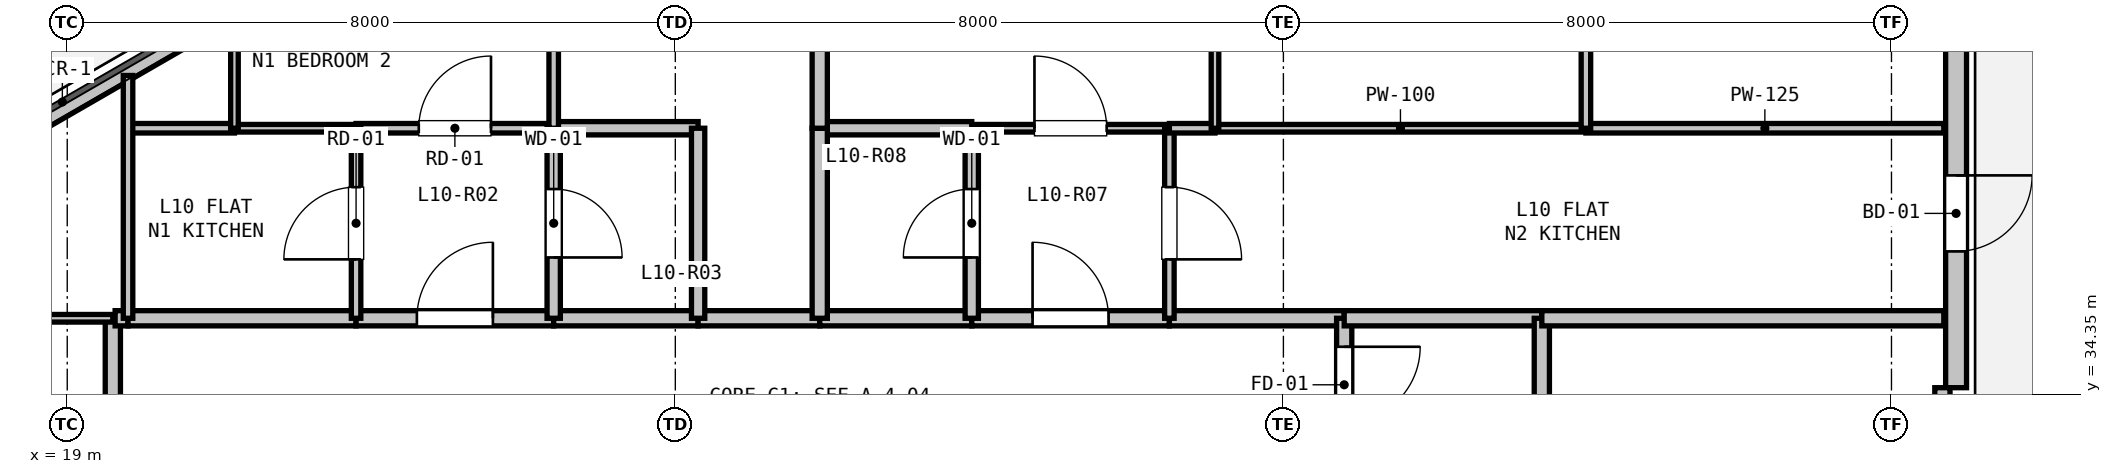
"""IFC4 building model, lengths in metres.
Left out: names, types, materials, properties, quantities, classifications, styles, units other than length and angle.
Written with IfcOpenShell. Run it as: python <this file> out.ifc"""

import sys

from ifc_helpers import new_model, si_unit, direction, frame, frame_2d, origin, place, context, subcontext, project, spatial, rectangle, extrude, element, fill, save


model = new_model("IFC4")
c1 = context("Model", 3, precision=1e-05, world=origin(), true_north=direction((0.0, 1.0)))
c2 = subcontext(c1, "Body", "Model", "MODEL_VIEW")
j1 = project(units=[si_unit("LENGTHUNIT", "METRE"), si_unit("PLANEANGLEUNIT", "RADIAN")], contexts=[c1])
p1 = place(None, origin())
s1 = spatial("IfcSite", under=j1, at=p1, CompositionType="ELEMENT")
p2 = place(p1, origin())
s2 = spatial("IfcBuilding", under=s1, at=p2, CompositionType="ELEMENT")
p3 = place(p2, frame((0.0, 0.0, 39.0)))
s3 = spatial("IfcBuildingStorey", under=s2, at=p3, CompositionType="ELEMENT", Elevation=39.0)
p4 = place(p3, frame((16.39, 36.617, 0.0), z_axis=(0.0, 0.0, 1.0), x_axis=(0.866027351828, 0.499996625875, 0.0)))
e1 = element("IfcWall", 1, at=p4, inside=s3, PredefinedType="PARAPET", context=c2, shape_type="SweptSolid", body=[
    extrude(rectangle(XDim=11.973, YDim=0.2, at=frame_2d((5.987, 0.0))), origin(), (0.0, 0.0, 1.0), 0.2),
])
p5 = place(p3, frame((43.85, 47.11, 0.0), z_axis=(0.0, 0.0, 1.0), x_axis=(0.0, -1.0, 0.0)))
e2 = element("IfcWall", 2, at=p5, inside=s3, PredefinedType="SOLIDWALL", context=c2, shape_type="SweptSolid", body=[
    extrude(rectangle(XDim=12.673, YDim=0.275, at=frame_2d((6.336, 0.0))), origin(), (0.0, 0.0, 1.0), 2.66),
])
p6 = place(p5, frame((9.88, 0.0, 0.0)))
e3 = element("IfcOpeningElement", 3, at=p6, cuts=e2, PredefinedType="OPENING", context=c2, shape_type="SweptSolid", body=[
    extrude(rectangle(XDim=1.0, YDim=2.1, at=frame_2d((0.5, 1.05))), frame((0.0, 0.147, 0.0), z_axis=(0.0, -1.0, 0.0), x_axis=(1.0, 0.0, 0.0)), (0.0, 0.0, 1.0), 0.295),
])
p7 = place(p3, frame((43.67, 34.437, 0.0), z_axis=(0.0, 0.0, 1.0), x_axis=(0.0, -1.0, 0.0)))
e4 = element("IfcWall", 4, at=p7, inside=s3, PredefinedType="PARAPET", context=c2, shape_type="SweptSolid", body=[
    extrude(rectangle(XDim=1.7, YDim=0.2, at=frame_2d((0.85, 0.0))), origin(), (0.0, 0.0, 1.0), 2.66),
])
p8 = place(p3, frame((19.6, 31.45, 0.0), z_axis=(0.0, 0.0, 1.0), x_axis=(0.0, 1.0, 0.0)))
e5 = element("IfcWall", 5, at=p8, inside=s3, PredefinedType="PARTITIONING", context=c2, shape_type="SweptSolid", body=[
    extrude(rectangle(XDim=3.9, YDim=0.2, at=frame_2d((1.95, 0.0))), origin(), (0.0, 0.0, 1.0), 2.337),
])
p9 = place(p3, frame((19.63, 35.35, 0.0), z_axis=(0.0, 0.0, 1.0), x_axis=(1.0, 0.0, 0.0)))
e6 = element("IfcWall", 6, at=p9, inside=s3, PredefinedType="PARTITIONING", context=c2, shape_type="SweptSolid", body=[
    extrude(rectangle(XDim=0.17, YDim=0.2, at=frame_2d((0.085, 0.0))), origin(), (0.0, 0.0, 1.0), 3.04),
])
p10 = place(p3, frame((19.8, 35.35, 0.0), z_axis=(0.0, 0.0, 1.0), x_axis=(1.0, 0.0, 0.0)))
e7 = element("IfcWall", 7, at=p10, inside=s3, PredefinedType="PARTITIONING", context=c2, shape_type="SweptSolid", body=[
    extrude(rectangle(XDim=3.0, YDim=0.2, at=frame_2d((1.5, 0.0))), origin(), (0.0, 0.0, 1.0), 3.04),
])
p11 = place(p3, frame((22.8, 35.35, 0.0), z_axis=(0.0, 0.0, 1.0), x_axis=(1.0, 0.0, 0.0)))
e8 = element("IfcWall", 8, at=p11, inside=s3, PredefinedType="PARTITIONING", context=c2, shape_type="SweptSolid", body=[
    extrude(rectangle(XDim=2.6, YDim=0.2, at=frame_2d((1.3, 0.0))), origin(), (0.0, 0.0, 1.0), 3.04),
])
p12 = place(p11, frame((0.8, 0.0, 0.0)))
e9 = element("IfcOpeningElement", 9, at=p12, cuts=e8, PredefinedType="OPENING", context=c2, shape_type="SweptSolid", body=[
    extrude(rectangle(XDim=1.0, YDim=2.15, at=frame_2d((0.5, 1.075))), frame((0.0, 0.11, 0.0), z_axis=(0.0, -1.0, 0.0), x_axis=(1.0, 0.0, 0.0)), (0.0, 0.0, 1.0), 0.22),
])
p13 = place(p3, frame((25.4, 35.35, 0.0), z_axis=(0.0, 0.0, 1.0), x_axis=(1.0, 0.0, 0.0)))
e10 = element("IfcWall", 10, at=p13, inside=s3, PredefinedType="PARTITIONING", context=c2, shape_type="SweptSolid", body=[
    extrude(rectangle(XDim=1.9, YDim=0.2, at=frame_2d((0.95, 0.0))), origin(), (0.0, 0.0, 1.0), 3.04),
])
p14 = place(p3, frame((27.3, 35.35, 0.0), z_axis=(0.0, 0.0, 1.0), x_axis=(1.0, 0.0, 0.0)))
e11 = element("IfcWall", 11, at=p14, inside=s3, PredefinedType="PARTITIONING", context=c2, shape_type="SweptSolid", body=[
    extrude(rectangle(XDim=1.6, YDim=0.2, at=frame_2d((0.8, 0.0))), origin(), (0.0, 0.0, 1.0), 3.04),
])
p15 = place(p3, frame((28.9, 35.35, 0.0), z_axis=(0.0, 0.0, 1.0), x_axis=(1.0, 0.0, 0.0)))
e12 = element("IfcWall", 12, at=p15, inside=s3, PredefinedType="PARTITIONING", context=c2, shape_type="SweptSolid", body=[
    extrude(rectangle(XDim=2.0, YDim=0.2, at=frame_2d((1.0, 0.0))), origin(), (0.0, 0.0, 1.0), 3.04),
])
p16 = place(p3, frame((30.9, 35.35, 0.0), z_axis=(0.0, 0.0, 1.0), x_axis=(1.0, 0.0, 0.0)))
e13 = element("IfcWall", 13, at=p16, inside=s3, PredefinedType="PARTITIONING", context=c2, shape_type="SweptSolid", body=[
    extrude(rectangle(XDim=2.6, YDim=0.2, at=frame_2d((1.3, 0.0))), origin(), (0.0, 0.0, 1.0), 3.04),
])
p17 = place(p16, frame((0.8, 0.0, 0.0)))
e14 = element("IfcOpeningElement", 14, at=p17, cuts=e13, PredefinedType="OPENING", context=c2, shape_type="SweptSolid", body=[
    extrude(rectangle(XDim=1.0, YDim=2.15, at=frame_2d((0.5, 1.075))), frame((0.0, 0.11, 0.0), z_axis=(0.0, -1.0, 0.0), x_axis=(1.0, 0.0, 0.0)), (0.0, 0.0, 1.0), 0.22),
])
p18 = place(p3, frame((33.5, 35.35, 0.0), z_axis=(0.0, 0.0, 1.0), x_axis=(1.0, 0.0, 0.0)))
e15 = element("IfcWall", 15, at=p18, inside=s3, PredefinedType="PARTITIONING", context=c2, shape_type="SweptSolid", body=[
    extrude(rectangle(XDim=2.3, YDim=0.2, at=frame_2d((1.15, 0.0))), origin(), (0.0, 0.0, 1.0), 3.04),
])
p19 = place(p3, frame((35.8, 35.35, 0.0), z_axis=(0.0, 0.0, 1.0), x_axis=(0.0, -1.0, 0.0)))
e16 = element("IfcWall", 16, at=p19, inside=s3, PredefinedType="PARTITIONING", context=c2, shape_type="SweptSolid", body=[
    extrude(rectangle(XDim=1.75, YDim=0.2, at=frame_2d((0.875, 0.0))), origin(), (0.0, 0.0, 1.0), 3.04),
])
p20 = place(p19, frame((0.375, 0.0, 0.0)))
e17 = element("IfcOpeningElement", 17, at=p20, cuts=e16, PredefinedType="OPENING", context=c2, shape_type="SweptSolid", body=[
    extrude(rectangle(XDim=1.0, YDim=2.15, at=frame_2d((0.5, 1.075))), frame((0.0, 0.11, 0.0), z_axis=(0.0, -1.0, 0.0), x_axis=(1.0, 0.0, 0.0)), (0.0, 0.0, 1.0), 0.22),
])
p21 = place(p3, frame((35.8, 35.35, 0.0), z_axis=(0.0, 0.0, 1.0), x_axis=(1.0, 0.0, 0.0)))
e18 = element("IfcWall", 18, at=p21, inside=s3, PredefinedType="PARTITIONING", context=c2, shape_type="SweptSolid", body=[
    extrude(rectangle(XDim=2.6, YDim=0.2, at=frame_2d((1.3, 0.0))), origin(), (0.0, 0.0, 1.0), 2.337),
])
p22 = place(p3, frame((38.4, 35.35, 0.0), z_axis=(0.0, 0.0, 1.0), x_axis=(0.0, -1.0, 0.0)))
e19 = element("IfcWall", 19, at=p22, inside=s3, PredefinedType="PARTITIONING", context=c2, shape_type="SweptSolid", body=[
    extrude(rectangle(XDim=5.35, YDim=0.2, at=frame_2d((2.675, 0.0))), origin(), (0.0, 0.0, 1.0), 2.337),
])
p23 = place(p3, frame((22.8, 37.85, 0.0), z_axis=(0.0, 0.0, 1.0), x_axis=(1.0, 0.0, 0.0)))
e20 = element("IfcWall", 20, at=p23, inside=s3, PredefinedType="PARTITIONING", context=c2, shape_type="SweptSolid", body=[
    extrude(rectangle(XDim=2.6, YDim=0.125, at=frame_2d((1.3, 0.0))), origin(), (0.0, 0.0, 1.0), 3.04),
])
p24 = place(p23, frame((0.825, 0.0, 0.0)))
e21 = element("IfcOpeningElement", 21, at=p24, cuts=e20, PredefinedType="OPENING", context=c2, shape_type="SweptSolid", body=[
    extrude(rectangle(XDim=0.95, YDim=2.1, at=frame_2d((0.475, 1.05))), frame((0.0, 0.073, 0.0), z_axis=(0.0, -1.0, 0.0), x_axis=(1.0, 0.0, 0.0)), (0.0, 0.0, 1.0), 0.145),
])
p25 = place(p3, frame((25.4, 37.85, 0.0), z_axis=(0.0, 0.0, 1.0), x_axis=(0.0, -1.0, 0.0)))
e22 = element("IfcWall", 22, at=p25, inside=s3, PredefinedType="PLUMBINGWALL", context=c2, shape_type="SweptSolid", body=[
    extrude(rectangle(XDim=2.5, YDim=0.175, at=frame_2d((1.25, 0.0))), origin(), (0.0, 0.0, 1.0), 3.04),
])
p26 = place(p25, frame((0.8, 0.0, 0.0)))
e23 = element("IfcOpeningElement", 23, at=p26, cuts=e22, PredefinedType="OPENING", context=c2, shape_type="SweptSolid", body=[
    extrude(rectangle(XDim=0.9, YDim=2.1, at=frame_2d((0.45, 1.05))), frame((0.0, 0.097, 0.0), z_axis=(0.0, -1.0, 0.0), x_axis=(1.0, 0.0, 0.0)), (0.0, 0.0, 1.0), 0.195),
])
p27 = place(p3, frame((22.8, 35.35, 0.0), z_axis=(0.0, 0.0, 1.0), x_axis=(0.0, 1.0, 0.0)))
e24 = element("IfcWall", 24, at=p27, inside=s3, PredefinedType="PARTITIONING", context=c2, shape_type="SweptSolid", body=[
    extrude(rectangle(XDim=2.5, YDim=0.125, at=frame_2d((1.25, 0.0))), origin(), (0.0, 0.0, 1.0), 3.04),
])
p28 = place(p27, frame((0.775, 0.0, 0.0)))
e25 = element("IfcOpeningElement", 25, at=p28, cuts=e24, PredefinedType="OPENING", context=c2, shape_type="SweptSolid", body=[
    extrude(rectangle(XDim=0.95, YDim=2.1, at=frame_2d((0.475, 1.05))), frame((0.0, 0.073, 0.0), z_axis=(0.0, -1.0, 0.0), x_axis=(1.0, 0.0, 0.0)), (0.0, 0.0, 1.0), 0.145),
])
p29 = place(p3, frame((30.9, 37.85, 0.0), z_axis=(0.0, 0.0, 1.0), x_axis=(1.0, 0.0, 0.0)))
e26 = element("IfcWall", 26, at=p29, inside=s3, PredefinedType="PARTITIONING", context=c2, shape_type="SweptSolid", body=[
    extrude(rectangle(XDim=2.6, YDim=0.1, at=frame_2d((1.3, 0.0))), origin(), (0.0, 0.0, 1.0), 3.04),
])
p30 = place(p29, frame((0.825, 0.0, 0.0)))
e27 = element("IfcOpeningElement", 27, at=p30, cuts=e26, PredefinedType="OPENING", context=c2, shape_type="SweptSolid", body=[
    extrude(rectangle(XDim=0.95, YDim=2.1, at=frame_2d((0.475, 1.05))), frame((0.0, 0.06, 0.0), z_axis=(0.0, -1.0, 0.0), x_axis=(1.0, 0.0, 0.0)), (0.0, 0.0, 1.0), 0.12),
])
p31 = place(p3, frame((33.5, 37.85, 0.0), z_axis=(0.0, 0.0, 1.0), x_axis=(0.0, -1.0, 0.0)))
e28 = element("IfcWall", 28, at=p31, inside=s3, PredefinedType="PARTITIONING", context=c2, shape_type="SweptSolid", body=[
    extrude(rectangle(XDim=2.5, YDim=0.125, at=frame_2d((1.25, 0.0))), origin(), (0.0, 0.0, 1.0), 3.04),
])
p32 = place(p31, frame((0.775, 0.0, 0.0)))
e29 = element("IfcOpeningElement", 29, at=p32, cuts=e28, PredefinedType="OPENING", context=c2, shape_type="SweptSolid", body=[
    extrude(rectangle(XDim=0.95, YDim=2.1, at=frame_2d((0.475, 1.05))), frame((0.0, 0.073, 0.0), z_axis=(0.0, -1.0, 0.0), x_axis=(1.0, 0.0, 0.0)), (0.0, 0.0, 1.0), 0.145),
])
p33 = place(p3, frame((30.9, 35.35, 0.0), z_axis=(0.0, 0.0, 1.0), x_axis=(0.0, 1.0, 0.0)))
e30 = element("IfcWall", 30, at=p33, inside=s3, PredefinedType="PLUMBINGWALL", context=c2, shape_type="SweptSolid", body=[
    extrude(rectangle(XDim=2.5, YDim=0.175, at=frame_2d((1.25, 0.0))), origin(), (0.0, 0.0, 1.0), 3.04),
])
p34 = place(p33, frame((0.8, 0.0, 0.0)))
e31 = element("IfcOpeningElement", 31, at=p34, cuts=e30, PredefinedType="OPENING", context=c2, shape_type="SweptSolid", body=[
    extrude(rectangle(XDim=0.9, YDim=2.1, at=frame_2d((0.45, 1.05))), frame((0.0, 0.097, 0.0), z_axis=(0.0, -1.0, 0.0), x_axis=(1.0, 0.0, 0.0)), (0.0, 0.0, 1.0), 0.195),
])
p35 = place(p3, frame((25.4, 37.85, 0.0), z_axis=(0.0, 0.0, 1.0), x_axis=(1.0, 0.0, 0.0)))
e32 = element("IfcWall", 32, at=p35, inside=s3, PredefinedType="PLUMBINGWALL", context=c2, shape_type="SweptSolid", body=[
    extrude(rectangle(XDim=1.9, YDim=0.175, at=frame_2d((0.95, 0.0))), origin(), (0.0, 0.0, 1.0), 3.04),
])
p36 = place(p3, frame((27.3, 37.85, 0.0), z_axis=(0.0, 0.0, 1.0), x_axis=(0.0, -1.0, 0.0)))
e33 = element("IfcWall", 33, at=p36, inside=s3, PredefinedType="PLUMBINGWALL", context=c2, shape_type="SweptSolid", body=[
    extrude(rectangle(XDim=2.5, YDim=0.175, at=frame_2d((1.25, 0.0))), origin(), (0.0, 0.0, 1.0), 3.04),
])
p37 = place(p3, frame((19.8, 37.85, 0.0), z_axis=(0.0, 0.0, 1.0), x_axis=(1.0, 0.0, 0.0)))
e34 = element("IfcWall", 34, at=p37, inside=s3, PredefinedType="PARTITIONING", context=c2, shape_type="SweptSolid", body=[
    extrude(rectangle(XDim=1.4, YDim=0.125, at=frame_2d((0.7, 0.0))), origin(), (0.0, 0.0, 1.0), 2.365),
])
p38 = place(p3, frame((21.2, 37.85, 0.0), z_axis=(0.0, 0.0, 1.0), x_axis=(1.0, 0.0, 0.0)))
e35 = element("IfcWall", 35, at=p38, inside=s3, PredefinedType="PARTITIONING", context=c2, shape_type="SweptSolid", body=[
    extrude(rectangle(XDim=1.6, YDim=0.1, at=frame_2d((0.8, 0.0))), origin(), (0.0, 0.0, 1.0), 3.04),
])
p39 = place(p3, frame((19.8, 35.35, 0.0), z_axis=(0.0, 0.0, 1.0), x_axis=(0.0, 1.0, 0.0)))
e36 = element("IfcWall", 36, at=p39, inside=s3, PredefinedType="PARTITIONING", context=c2, shape_type="SweptSolid", body=[
    extrude(rectangle(XDim=3.194, YDim=0.125, at=frame_2d((1.597, 0.0))), origin(), (0.0, 0.0, 1.0), 2.365),
])
p40 = place(p3, frame((28.9, 37.85, 0.0), z_axis=(0.0, 0.0, 1.0), x_axis=(1.0, 0.0, 0.0)))
e37 = element("IfcWall", 37, at=p40, inside=s3, PredefinedType="PLUMBINGWALL", context=c2, shape_type="SweptSolid", body=[
    extrude(rectangle(XDim=2.0, YDim=0.175, at=frame_2d((1.0, 0.0))), origin(), (0.0, 0.0, 1.0), 3.04),
])
p41 = place(p3, frame((28.9, 35.35, 0.0), z_axis=(0.0, 0.0, 1.0), x_axis=(0.0, 1.0, 0.0)))
e38 = element("IfcWall", 38, at=p41, inside=s3, PredefinedType="PARTITIONING", context=c2, shape_type="SweptSolid", body=[
    extrude(rectangle(XDim=2.5, YDim=0.2, at=frame_2d((1.25, 0.0))), origin(), (0.0, 0.0, 1.0), 3.04),
])
p42 = place(p3, frame((43.688, 35.35, 0.0), z_axis=(0.0, 0.0, 1.0), x_axis=(-1.0, 0.0, 0.0)))
e39 = element("IfcWall", 39, at=p42, inside=s3, PredefinedType="PARTITIONING", context=c2, shape_type="SweptSolid", body=[
    extrude(rectangle(XDim=5.289, YDim=0.2, at=frame_2d((2.644, 0.0))), origin(), (0.0, 0.0, 1.0), 2.337),
])
p43 = place(p3, frame((33.5, 37.85, 0.0), z_axis=(0.0, 0.0, 1.0), x_axis=(1.0, 0.0, 0.0)))
e40 = element("IfcWall", 40, at=p43, inside=s3, PredefinedType="PARTITIONING", context=c2, shape_type="SweptSolid", body=[
    extrude(rectangle(XDim=0.6, YDim=0.125, at=frame_2d((0.3, 0.0))), origin(), (0.0, 0.0, 1.0), 3.04),
])
p44 = place(p3, frame((34.1, 37.85, 0.0), z_axis=(0.0, 0.0, 1.0), x_axis=(1.0, 0.0, 0.0)))
e41 = element("IfcWall", 41, at=p44, inside=s3, PredefinedType="PARTITIONING", context=c2, shape_type="SweptSolid", body=[
    extrude(rectangle(XDim=4.88, YDim=0.1, at=frame_2d((2.44, 0.0))), origin(), (0.0, 0.0, 1.0), 2.337),
])
p45 = place(p3, frame((38.98, 37.85, 0.0), z_axis=(0.0, 0.0, 1.0), x_axis=(1.0, 0.0, 0.0)))
e42 = element("IfcWall", 42, at=p45, inside=s3, PredefinedType="PARTITIONING", context=c2, shape_type="SweptSolid", body=[
    extrude(rectangle(XDim=4.708, YDim=0.125, at=frame_2d((2.354, 0.0))), origin(), (0.0, 0.0, 1.0), 2.337),
])
p46 = place(p3, frame((17.15, 35.35, 0.0), z_axis=(0.0, 0.0, 1.0), x_axis=(1.0, 0.0, 0.0)))
e43 = element("IfcWall", 43, at=p46, inside=s3, PredefinedType="PARTITIONING", context=c2, shape_type="SweptSolid", body=[
    extrude(rectangle(XDim=2.45, YDim=0.1, at=frame_2d((1.225, 0.0))), origin(), (0.0, 0.0, 1.0), 3.04),
])
p47 = place(p3, frame((21.2, 37.85, 0.0), z_axis=(0.0, 0.0, 1.0), x_axis=(0.0, 1.0, 0.0)))
e44 = element("IfcWall", 44, at=p47, inside=s3, PredefinedType="PARTITIONING", context=c2, shape_type="SweptSolid", body=[
    extrude(rectangle(XDim=1.502, YDim=0.1, at=frame_2d((0.751, 0.0))), origin(), (0.0, 0.0, 1.0), 2.365),
])
p48 = place(p3, frame((25.4, 41.777, 0.0), z_axis=(0.0, 0.0, 1.0), x_axis=(0.0, -1.0, 0.0)))
e45 = element("IfcWall", 45, at=p48, inside=s3, PredefinedType="PARTITIONING", context=c2, shape_type="SweptSolid", body=[
    extrude(rectangle(XDim=3.927, YDim=0.125, at=frame_2d((1.964, 0.0))), origin(), (0.0, 0.0, 1.0), 2.365),
])
p49 = place(p48, frame((1.489, 0.0, 0.0)))
e46 = element("IfcOpeningElement", 46, at=p49, cuts=e45, PredefinedType="OPENING", context=c2, shape_type="SweptSolid", body=[
    extrude(rectangle(XDim=0.95, YDim=2.1, at=frame_2d((0.475, 1.05))), frame((0.0, 0.073, 0.0), z_axis=(0.0, -1.0, 0.0), x_axis=(1.0, 0.0, 0.0)), (0.0, 0.0, 1.0), 0.145),
])
p50 = place(p3, frame((28.9, 43.653, 0.0), z_axis=(0.0, 0.0, 1.0), x_axis=(0.0, -1.0, 0.0)))
e47 = element("IfcWall", 47, at=p50, inside=s3, PredefinedType="PARTITIONING", context=c2, shape_type="SweptSolid", body=[
    extrude(rectangle(XDim=5.803, YDim=0.2, at=frame_2d((2.901, 0.0))), origin(), (0.0, 0.0, 1.0), 2.365),
])
p51 = place(p3, frame((34.1, 43.86, 0.0), z_axis=(0.0, 0.0, 1.0), x_axis=(0.0, -1.0, 0.0)))
e48 = element("IfcWall", 48, at=p51, inside=s3, PredefinedType="PARTITIONING", context=c2, shape_type="SweptSolid", body=[
    extrude(rectangle(XDim=6.01, YDim=0.1, at=frame_2d((3.005, 0.0))), origin(), (0.0, 0.0, 1.0), 3.04),
])
p52 = place(p51, frame((2.53, 0.0, 0.0)))
e49 = element("IfcOpeningElement", 49, at=p52, cuts=e48, PredefinedType="OPENING", context=c2, shape_type="SweptSolid", body=[
    extrude(rectangle(XDim=0.95, YDim=2.1, at=frame_2d((0.475, 1.05))), frame((0.0, 0.06, 0.0), z_axis=(0.0, -1.0, 0.0), x_axis=(1.0, 0.0, 0.0)), (0.0, 0.0, 1.0), 0.12),
])
p53 = place(p3, frame((38.98, 43.86, 0.0), z_axis=(0.0, 0.0, 1.0), x_axis=(0.0, -1.0, 0.0)))
e50 = element("IfcWall", 50, at=p53, inside=s3, PredefinedType="PARTITIONING", context=c2, shape_type="SweptSolid", body=[
    extrude(rectangle(XDim=6.01, YDim=0.125, at=frame_2d((3.005, 0.0))), origin(), (0.0, 0.0, 1.0), 3.04),
])
p54 = place(p53, frame((2.53, 0.0, 0.0)))
e51 = element("IfcOpeningElement", 51, at=p54, cuts=e50, PredefinedType="OPENING", context=c2, shape_type="SweptSolid", body=[
    extrude(rectangle(XDim=0.95, YDim=2.1, at=frame_2d((0.475, 1.05))), frame((0.0, 0.073, 0.0), z_axis=(0.0, -1.0, 0.0), x_axis=(1.0, 0.0, 0.0)), (0.0, 0.0, 1.0), 0.145),
])
p55 = place(p6, origin())
e52 = element("IfcDoor", 52, at=p55, inside=s3, OperationType="SINGLE_SWING_LEFT", PredefinedType="DOOR", context=c2, shape_type="SweptSolid", body=[
    extrude(rectangle(XDim=1.0, YDim=2.1, at=frame_2d((0.5, 1.05))), frame((0.0, 0.025, 0.0), z_axis=(0.0, -1.0, 0.0), x_axis=(1.0, 0.0, 0.0)), (0.0, 0.0, 1.0), 0.05),
])
fill(e3, e52)
p56 = place(p20, origin())
e53 = element("IfcDoor", 53, at=p56, inside=s3, OperationType="SINGLE_SWING_LEFT", PredefinedType="DOOR", context=c2, shape_type="SweptSolid", body=[
    extrude(rectangle(XDim=1.0, YDim=2.15, at=frame_2d((0.5, 1.075))), frame((0.0, 0.025, 0.0), z_axis=(0.0, -1.0, 0.0), x_axis=(1.0, 0.0, 0.0)), (0.0, 0.0, 1.0), 0.05),
])
fill(e17, e53)
p57 = place(p12, origin())
e54 = element("IfcDoor", 54, at=p57, inside=s3, OperationType="SINGLE_SWING_RIGHT", PredefinedType="DOOR", context=c2, shape_type="SweptSolid", body=[
    extrude(rectangle(XDim=1.0, YDim=2.15, at=frame_2d((0.5, 1.075))), frame((0.0, 0.025, 0.0), z_axis=(0.0, -1.0, 0.0), x_axis=(1.0, 0.0, 0.0)), (0.0, 0.0, 1.0), 0.05),
])
fill(e9, e54)
p58 = place(p17, origin())
e55 = element("IfcDoor", 55, at=p58, inside=s3, OperationType="SINGLE_SWING_LEFT", PredefinedType="DOOR", context=c2, shape_type="SweptSolid", body=[
    extrude(rectangle(XDim=1.0, YDim=2.15, at=frame_2d((0.5, 1.075))), frame((0.0, 0.025, 0.0), z_axis=(0.0, -1.0, 0.0), x_axis=(1.0, 0.0, 0.0)), (0.0, 0.0, 1.0), 0.05),
])
fill(e14, e55)
p59 = place(p26, origin())
e56 = element("IfcDoor", 56, at=p59, inside=s3, OperationType="SINGLE_SWING_RIGHT", PredefinedType="DOOR", context=c2, shape_type="SweptSolid", body=[
    extrude(rectangle(XDim=0.9, YDim=2.1, at=frame_2d((0.45, 1.05))), frame((0.0, 0.025, 0.0), z_axis=(0.0, -1.0, 0.0), x_axis=(1.0, 0.0, 0.0)), (0.0, 0.0, 1.0), 0.05),
])
fill(e23, e56)
p60 = place(p28, origin())
e57 = element("IfcDoor", 57, at=p60, inside=s3, OperationType="SINGLE_SWING_LEFT", PredefinedType="DOOR", context=c2, shape_type="SweptSolid", body=[
    extrude(rectangle(XDim=0.95, YDim=2.1, at=frame_2d((0.475, 1.05))), frame((0.0, 0.025, 0.0), z_axis=(0.0, -1.0, 0.0), x_axis=(1.0, 0.0, 0.0)), (0.0, 0.0, 1.0), 0.05),
])
fill(e25, e57)
p61 = place(p24, origin())
e58 = element("IfcDoor", 58, at=p61, inside=s3, OperationType="SINGLE_SWING_RIGHT", PredefinedType="DOOR", context=c2, shape_type="SweptSolid", body=[
    extrude(rectangle(XDim=0.95, YDim=2.1, at=frame_2d((0.475, 1.05))), frame((0.0, 0.025, 0.0), z_axis=(0.0, -1.0, 0.0), x_axis=(1.0, 0.0, 0.0)), (0.0, 0.0, 1.0), 0.05),
])
fill(e21, e58)
p62 = place(p34, origin())
e59 = element("IfcDoor", 59, at=p62, inside=s3, OperationType="SINGLE_SWING_LEFT", PredefinedType="DOOR", context=c2, shape_type="SweptSolid", body=[
    extrude(rectangle(XDim=0.9, YDim=2.1, at=frame_2d((0.45, 1.05))), frame((0.0, 0.025, 0.0), z_axis=(0.0, -1.0, 0.0), x_axis=(1.0, 0.0, 0.0)), (0.0, 0.0, 1.0), 0.05),
])
fill(e31, e59)
p63 = place(p32, origin())
e60 = element("IfcDoor", 60, at=p63, inside=s3, OperationType="SINGLE_SWING_RIGHT", PredefinedType="DOOR", context=c2, shape_type="SweptSolid", body=[
    extrude(rectangle(XDim=0.95, YDim=2.1, at=frame_2d((0.475, 1.05))), frame((0.0, 0.025, 0.0), z_axis=(0.0, -1.0, 0.0), x_axis=(1.0, 0.0, 0.0)), (0.0, 0.0, 1.0), 0.05),
])
fill(e29, e60)
p64 = place(p30, origin())
e61 = element("IfcDoor", 61, at=p64, inside=s3, OperationType="SINGLE_SWING_LEFT", PredefinedType="DOOR", context=c2, shape_type="SweptSolid", body=[
    extrude(rectangle(XDim=0.95, YDim=2.1, at=frame_2d((0.475, 1.05))), frame((0.0, 0.025, 0.0), z_axis=(0.0, -1.0, 0.0), x_axis=(1.0, 0.0, 0.0)), (0.0, 0.0, 1.0), 0.05),
])
fill(e27, e61)
save(model, sys.argv[1])
